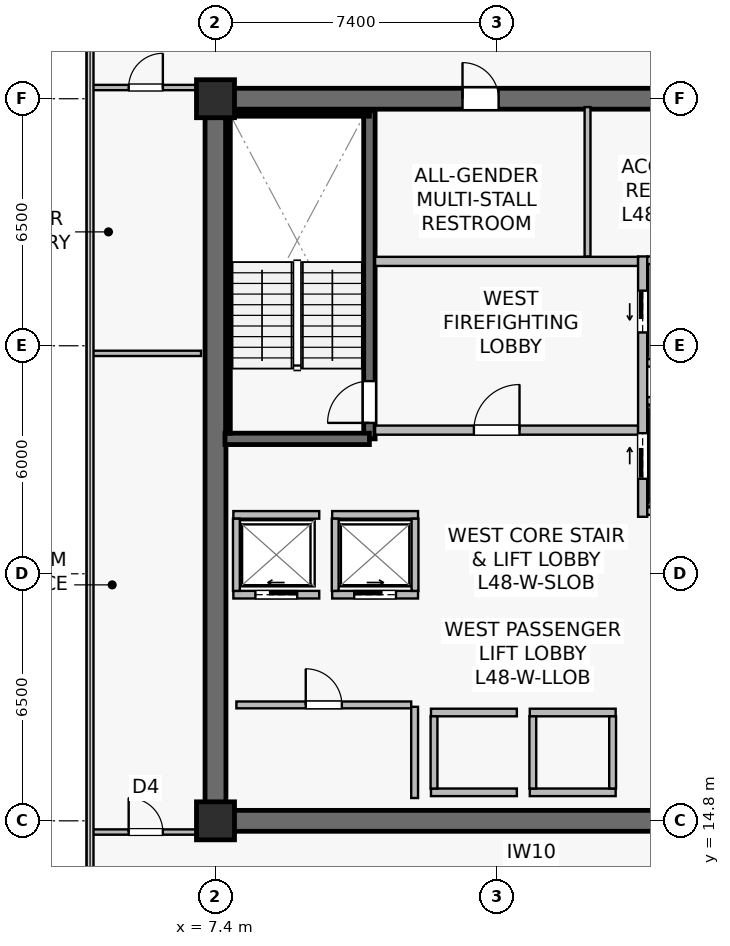
"""IFC4 building model, lengths in metres.
Left out: names, types, materials, properties, quantities, classifications, styles, units other than length and angle.
Written with IfcOpenShell. Run it as: python <this file> out.ifc"""

import sys

from ifc_helpers import new_model, si_unit, direction, frame, frame_2d, origin, origin_2d, place, context, subcontext, project, spatial, rectangle, extrude, source, transform, mapped, element, fill, save


model = new_model("IFC4")
c1 = context("Model", 3, precision=1e-05, world=origin(), true_north=direction((0.0, 1.0)))
c2 = subcontext(c1, "Body", "Model", "MODEL_VIEW")
j1 = project(units=[si_unit("LENGTHUNIT", "METRE"), si_unit("PLANEANGLEUNIT", "RADIAN")], contexts=[c1])
p1 = place(None, origin())
s1 = spatial("IfcSite", under=j1, at=p1, CompositionType="ELEMENT")
p2 = place(p1, origin())
s2 = spatial("IfcBuilding", under=s1, at=p2, CompositionType="ELEMENT")
p3 = place(p2, frame((0.0, 0.0, 201.4)))
s3 = spatial("IfcBuildingStorey", under=s2, at=p3, CompositionType="ELEMENT", Elevation=201.4)
p4 = place(p3, frame((7.125, 14.8, 0.0), z_axis=(0.0, 0.0, 1.0), x_axis=(1.0, 0.0, 0.0)))
e1 = element("IfcWall", 1, at=p4, inside=s3, PredefinedType="SHEAR", context=c2, shape_type="SweptSolid", body=[
    extrude(rectangle(XDim=15.35, YDim=0.55, at=frame_2d((7.675, 0.0))), origin(), (0.0, 0.0, 1.0), 3.8),
])
p5 = place(p3, frame((7.125, 33.8, 0.0), z_axis=(0.0, 0.0, 1.0), x_axis=(1.0, 0.0, 0.0)))
e2 = element("IfcWall", 2, at=p5, inside=s3, PredefinedType="SHEAR", context=c2, shape_type="SweptSolid", body=[
    extrude(rectangle(XDim=15.35, YDim=0.55, at=frame_2d((7.675, 0.0))), origin(), (0.0, 0.0, 1.0), 3.8),
])
p6 = place(p5, frame((6.775, 0.0, 0.0)))
e3 = element("IfcOpeningElement", 3, at=p6, cuts=e2, PredefinedType="OPENING", context=c2, shape_type="SweptSolid", body=[
    extrude(rectangle(XDim=0.95, YDim=2.15, at=frame_2d((0.475, 1.075))), frame((0.0, 0.285, 0.0), z_axis=(0.0, -1.0, 0.0), x_axis=(1.0, 0.0, 0.0)), (0.0, 0.0, 1.0), 0.57),
])
p7 = place(p5, frame((11.84, 0.0, 0.0)))
e4 = element("IfcOpeningElement", 4, at=p7, cuts=e2, PredefinedType="OPENING", context=c2, shape_type="SweptSolid", body=[
    extrude(rectangle(XDim=0.95, YDim=2.15, at=frame_2d((0.475, 1.075))), frame((0.0, 0.285, 0.0), z_axis=(0.0, -1.0, 0.0), x_axis=(1.0, 0.0, 0.0)), (0.0, 0.0, 1.0), 0.57),
])
p8 = place(p3, frame((7.4, 15.075, 0.0), z_axis=(0.0, 0.0, 1.0), x_axis=(0.0, 1.0, 0.0)))
e5 = element("IfcWall", 5, at=p8, inside=s3, PredefinedType="SHEAR", context=c2, shape_type="SweptSolid", body=[
    extrude(rectangle(XDim=18.45, YDim=0.55, at=frame_2d((9.225, 0.0))), origin(), (0.0, 0.0, 1.0), 3.8),
])
p9 = place(p3, frame((11.45, 24.85, 0.0), z_axis=(0.0, 0.0, 1.0), x_axis=(0.0, 1.0, 0.0)))
e6 = element("IfcWall", 6, at=p9, inside=s3, PredefinedType="SHEAR", context=c2, shape_type="SweptSolid", body=[
    extrude(rectangle(XDim=8.63, YDim=0.3, at=frame_2d((4.315, 0.0))), origin(), (0.0, 0.0, 1.0), 3.8),
])
p10 = place(p9, frame((0.42, 0.0, 0.0)))
e7 = element("IfcOpeningElement", 7, at=p10, cuts=e6, PredefinedType="OPENING", context=c2, shape_type="SweptSolid", body=[
    extrude(rectangle(XDim=1.1, YDim=2.15, at=frame_2d((0.55, 1.075))), frame((0.0, 0.16, 0.0), z_axis=(0.0, -1.0, 0.0), x_axis=(1.0, 0.0, 0.0)), (0.0, 0.0, 1.0), 0.32),
])
p11 = place(p3, frame((7.65, 24.85, 0.0), z_axis=(0.0, 0.0, 1.0), x_axis=(1.0, 0.0, 0.0)))
e8 = element("IfcWall", 8, at=p11, inside=s3, PredefinedType="SHEAR", context=c2, shape_type="SweptSolid", body=[
    extrude(rectangle(XDim=3.8, YDim=0.3, at=frame_2d((1.9, 0.0))), origin(), (0.0, 0.0, 1.0), 3.8),
])
p12 = place(p3, frame((7.73, 33.4, 0.0), z_axis=(0.0, 0.0, 1.0), x_axis=(1.0, 0.0, 0.0)))
e9 = element("IfcWall", 9, at=p12, inside=s3, PredefinedType="SOLIDWALL", context=c2, shape_type="SweptSolid", body=[
    extrude(rectangle(XDim=3.72, YDim=0.12, at=frame_2d((1.86, 0.0))), origin(), (0.0, 0.0, 1.0), 3.8),
])
p13 = place(p3, frame((7.73, 25.0, 0.0), z_axis=(0.0, 0.0, 1.0), x_axis=(0.0, 1.0, 0.0)))
e10 = element("IfcWall", 10, at=p13, inside=s3, PredefinedType="SOLIDWALL", context=c2, shape_type="SweptSolid", body=[
    extrude(rectangle(XDim=8.32, YDim=0.12, at=frame_2d((4.16, 0.0))), origin(), (0.0, 0.0, 1.0), 3.8),
])
m1 = source(origin(), c2, "Body", "SweptSolid", [
    extrude(rectangle(XDim=1.0, YDim=1.0, at=origin_2d()), origin(), (0.0, 0.0, 1.0), 4.1),
])
for number, where, z_axis, x_axis in (
    (11, (7.4, 14.8, 0.0), (0.0, 0.0, 1.0), (1.0, 0.0, 0.0)),
    (12, (7.4, 33.8, 0.0), (0.0, 0.0, 1.0), (1.0, 0.0, 0.0)),
):
    element("IfcColumn", number, at=place(p3, frame(where, z_axis=z_axis, x_axis=x_axis)), inside=s3, PredefinedType="COLUMN", context=c2, shape_type="MappedRepresentation", body=[
        mapped(m1, transform((0.0, 0.0, 0.0), scale=1.0)),
    ])
p14 = place(p3, frame((11.6, 25.08, 0.0), z_axis=(0.0, 0.0, 1.0), x_axis=(1.0, 0.0, 0.0)))
e13 = element("IfcWall", 13, at=p14, inside=s3, PredefinedType="SOLIDWALL", context=c2, shape_type="SweptSolid", body=[
    extrude(rectangle(XDim=6.92, YDim=0.24, at=frame_2d((3.46, 0.0))), origin(), (0.0, 0.0, 1.0), 3.197),
])
p15 = place(p14, frame((2.6, 0.0, 0.0)))
e14 = element("IfcOpeningElement", 14, at=p15, cuts=e13, PredefinedType="OPENING", context=c2, shape_type="SweptSolid", body=[
    extrude(rectangle(XDim=1.2, YDim=2.16, at=frame_2d((0.6, 1.08))), frame((0.0, 0.13, 0.0), z_axis=(0.0, -1.0, 0.0), x_axis=(1.0, 0.0, 0.0)), (0.0, 0.0, 1.0), 0.26),
])
p16 = place(p3, frame((11.6, 29.52, 0.0), z_axis=(0.0, 0.0, 1.0), x_axis=(1.0, 0.0, 0.0)))
e15 = element("IfcWall", 15, at=p16, inside=s3, PredefinedType="SOLIDWALL", context=c2, shape_type="SweptSolid", body=[
    extrude(rectangle(XDim=6.92, YDim=0.24, at=frame_2d((3.46, 0.0))), origin(), (0.0, 0.0, 1.0), 3.197),
])
p17 = place(p3, frame((18.64, 22.8, 0.0), z_axis=(0.0, 0.0, 1.0), x_axis=(0.0, 1.0, 0.0)))
e16 = element("IfcWall", 16, at=p17, inside=s3, PredefinedType="SOLIDWALL", context=c2, shape_type="SweptSolid", body=[
    extrude(rectangle(XDim=6.85, YDim=0.24, at=frame_2d((3.425, 0.0))), origin(), (0.0, 0.0, 1.0), 2.935),
])
p18 = place(p17, frame((4.85, 0.0, 0.0)))
e17 = element("IfcOpeningElement", 17, at=p18, cuts=e16, PredefinedType="OPENING", context=c2, shape_type="SweptSolid", body=[
    extrude(rectangle(XDim=1.1, YDim=2.22, at=frame_2d((0.55, 1.11))), frame((0.0, 0.13, 0.0), z_axis=(0.0, -1.0, 0.0), x_axis=(1.0, 0.0, 0.0)), (0.0, 0.0, 1.0), 0.26),
])
p19 = place(p17, frame((1.0, 0.0, 0.0)))
e18 = element("IfcOpeningElement", 18, at=p19, cuts=e16, PredefinedType="OPENING", context=c2, shape_type="SweptSolid", body=[
    extrude(rectangle(XDim=1.2, YDim=2.22, at=frame_2d((0.6, 1.11))), frame((0.0, 0.13, 0.0), z_axis=(0.0, -1.0, 0.0), x_axis=(1.0, 0.0, 0.0)), (0.0, 0.0, 1.0), 0.26),
])
for number, where, z_axis, x_axis in (
    (19, (13.07, 17.65, 0.0), (0.0, 0.0, 1.0), (1.0, 0.0, 0.0)),
    (20, (13.07, 15.55, 0.0), (0.0, 0.0, 1.0), (1.0, 0.0, 0.0)),
):
    element("IfcWall", number, at=place(p3, frame(where, z_axis=z_axis, x_axis=x_axis)), inside=s3, PredefinedType="SOLIDWALL", context=c2, shape_type="SweptSolid", body=[
        extrude(rectangle(XDim=2.26, YDim=0.2, at=frame_2d((1.13, 0.0))), origin(), (0.0, 0.0, 1.0), 3.197),
    ])
p20 = place(p3, frame((13.15, 15.65, 0.0), z_axis=(0.0, 0.0, 1.0), x_axis=(0.0, 1.0, 0.0)))
e21 = element("IfcWall", 21, at=p20, inside=s3, PredefinedType="SOLIDWALL", context=c2, shape_type="SweptSolid", body=[
    extrude(rectangle(XDim=1.9, YDim=0.18, at=frame_2d((0.95, 0.0))), origin(), (0.0, 0.0, 1.0), 3.8),
])
for number, where, z_axis, x_axis in (
    (22, (15.67, 17.65, 0.0), (0.0, 0.0, 1.0), (1.0, 0.0, 0.0)),
    (23, (15.67, 15.55, 0.0), (0.0, 0.0, 1.0), (1.0, 0.0, 0.0)),
):
    element("IfcWall", number, at=place(p3, frame(where, z_axis=z_axis, x_axis=x_axis)), inside=s3, PredefinedType="SOLIDWALL", context=c2, shape_type="SweptSolid", body=[
        extrude(rectangle(XDim=2.26, YDim=0.2, at=frame_2d((1.13, 0.0))), origin(), (0.0, 0.0, 1.0), 3.8),
    ])
for number, where, z_axis, x_axis in (
    (24, (15.75, 15.65, 0.0), (0.0, 0.0, 1.0), (0.0, 1.0, 0.0)),
    (25, (17.85, 15.65, 0.0), (0.0, 0.0, 1.0), (0.0, 1.0, 0.0)),
):
    element("IfcWall", number, at=place(p3, frame(where, z_axis=z_axis, x_axis=x_axis)), inside=s3, PredefinedType="SOLIDWALL", context=c2, shape_type="SweptSolid", body=[
        extrude(rectangle(XDim=1.9, YDim=0.18, at=frame_2d((0.95, 0.0))), origin(), (0.0, 0.0, 1.0), 3.8),
    ])
p21 = place(p3, frame((7.87, 20.75, 0.0), z_axis=(0.0, 0.0, 1.0), x_axis=(1.0, 0.0, 0.0)))
e26 = element("IfcWall", 26, at=p21, inside=s3, PredefinedType="SOLIDWALL", context=c2, shape_type="SweptSolid", body=[
    extrude(rectangle(XDim=2.26, YDim=0.2, at=frame_2d((1.13, 0.0))), origin(), (0.0, 0.0, 1.0), 3.8),
])
p22 = place(p21, frame((0.58, 0.0, 0.0)))
e27 = element("IfcOpeningElement", 27, at=p22, cuts=e26, PredefinedType="OPENING", context=c2, shape_type="SweptSolid", body=[
    extrude(rectangle(XDim=1.1, YDim=2.22, at=frame_2d((0.55, 1.11))), frame((0.0, 0.11, 0.0), z_axis=(0.0, -1.0, 0.0), x_axis=(1.0, 0.0, 0.0)), (0.0, 0.0, 1.0), 0.22),
])
p23 = place(p3, frame((7.87, 22.85, 0.0), z_axis=(0.0, 0.0, 1.0), x_axis=(1.0, 0.0, 0.0)))
e28 = element("IfcWall", 28, at=p23, inside=s3, PredefinedType="SOLIDWALL", context=c2, shape_type="SweptSolid", body=[
    extrude(rectangle(XDim=2.26, YDim=0.2, at=frame_2d((1.13, 0.0))), origin(), (0.0, 0.0, 1.0), 3.8),
])
p24 = place(p3, frame((7.95, 20.85, 0.0), z_axis=(0.0, 0.0, 1.0), x_axis=(0.0, 1.0, 0.0)))
e29 = element("IfcWall", 29, at=p24, inside=s3, PredefinedType="SOLIDWALL", context=c2, shape_type="SweptSolid", body=[
    extrude(rectangle(XDim=1.9, YDim=0.18, at=frame_2d((0.95, 0.0))), origin(), (0.0, 0.0, 1.0), 3.8),
])
p25 = place(p3, frame((10.47, 20.75, 0.0), z_axis=(0.0, 0.0, 1.0), x_axis=(1.0, 0.0, 0.0)))
e30 = element("IfcWall", 30, at=p25, inside=s3, PredefinedType="SOLIDWALL", context=c2, shape_type="SweptSolid", body=[
    extrude(rectangle(XDim=2.26, YDim=0.2, at=frame_2d((1.13, 0.0))), origin(), (0.0, 0.0, 1.0), 3.8),
])
p26 = place(p25, frame((0.58, 0.0, 0.0)))
e31 = element("IfcOpeningElement", 31, at=p26, cuts=e30, PredefinedType="OPENING", context=c2, shape_type="SweptSolid", body=[
    extrude(rectangle(XDim=1.1, YDim=2.22, at=frame_2d((0.55, 1.11))), frame((0.0, 0.11, 0.0), z_axis=(0.0, -1.0, 0.0), x_axis=(1.0, 0.0, 0.0)), (0.0, 0.0, 1.0), 0.22),
])
p27 = place(p3, frame((10.47, 22.85, 0.0), z_axis=(0.0, 0.0, 1.0), x_axis=(1.0, 0.0, 0.0)))
e32 = element("IfcWall", 32, at=p27, inside=s3, PredefinedType="SOLIDWALL", context=c2, shape_type="SweptSolid", body=[
    extrude(rectangle(XDim=2.26, YDim=0.2, at=frame_2d((1.13, 0.0))), origin(), (0.0, 0.0, 1.0), 3.8),
])
for number, where, z_axis, x_axis in (
    (33, (10.55, 20.85, 0.0), (0.0, 0.0, 1.0), (0.0, 1.0, 0.0)),
    (34, (12.65, 20.85, 0.0), (0.0, 0.0, 1.0), (0.0, 1.0, 0.0)),
):
    element("IfcWall", number, at=place(p3, frame(where, z_axis=z_axis, x_axis=x_axis)), inside=s3, PredefinedType="SOLIDWALL", context=c2, shape_type="SweptSolid", body=[
        extrude(rectangle(XDim=1.9, YDim=0.18, at=frame_2d((0.95, 0.0))), origin(), (0.0, 0.0, 1.0), 3.8),
    ])
p28 = place(p3, frame((18.76, 29.55, 0.0), z_axis=(0.0, 0.0, 1.0), x_axis=(1.0, 0.0, 0.0)))
e35 = element("IfcWall", 35, at=p28, inside=s3, PredefinedType="SOLIDWALL", context=c2, shape_type="SweptSolid", body=[
    extrude(rectangle(XDim=2.19, YDim=0.2, at=frame_2d((1.095, 0.0))), origin(), (0.0, 0.0, 1.0), 3.8),
])
p29 = place(p3, frame((18.76, 26.85, 0.0), z_axis=(0.0, 0.0, 1.0), x_axis=(1.0, 0.0, 0.0)))
e36 = element("IfcWall", 36, at=p29, inside=s3, PredefinedType="SOLIDWALL", context=c2, shape_type="SweptSolid", body=[
    extrude(rectangle(XDim=2.19, YDim=0.2, at=frame_2d((1.095, 0.0))), origin(), (0.0, 0.0, 1.0), 3.197),
])
for number, where, z_axis, x_axis in (
    (37, (18.76, 25.85, 0.0), (0.0, 0.0, 1.0), (1.0, 0.0, 0.0)),
    (38, (18.76, 22.95, 0.0), (0.0, 0.0, 1.0), (1.0, 0.0, 0.0)),
):
    element("IfcWall", number, at=place(p3, frame(where, z_axis=z_axis, x_axis=x_axis)), inside=s3, PredefinedType="SOLIDWALL", context=c2, shape_type="SweptSolid", body=[
        extrude(rectangle(XDim=2.19, YDim=0.2, at=frame_2d((1.095, 0.0))), origin(), (0.0, 0.0, 1.0), 3.8),
    ])
p30 = place(p3, frame((7.95, 17.85, 0.0), z_axis=(0.0, 0.0, 1.0), x_axis=(1.0, 0.0, 0.0)))
e39 = element("IfcWall", 39, at=p30, inside=s3, PredefinedType="SOLIDWALL", context=c2, shape_type="SweptSolid", body=[
    extrude(rectangle(XDim=4.6, YDim=0.18, at=frame_2d((2.3, 0.0))), origin(), (0.0, 0.0, 1.0), 3.8),
])
p31 = place(p30, frame((1.825, 0.0, 0.0)))
e40 = element("IfcOpeningElement", 40, at=p31, cuts=e39, PredefinedType="OPENING", context=c2, shape_type="SweptSolid", body=[
    extrude(rectangle(XDim=0.95, YDim=2.15, at=frame_2d((0.475, 1.075))), frame((0.0, 0.1, 0.0), z_axis=(0.0, -1.0, 0.0), x_axis=(1.0, 0.0, 0.0)), (0.0, 0.0, 1.0), 0.2),
])
p32 = place(p3, frame((12.64, 15.4, 0.0), z_axis=(0.0, 0.0, 1.0), x_axis=(0.0, 1.0, 0.0)))
e41 = element("IfcWall", 41, at=p32, inside=s3, PredefinedType="SOLIDWALL", context=c2, shape_type="SweptSolid", body=[
    extrude(rectangle(XDim=2.4, YDim=0.18, at=frame_2d((1.2, 0.0))), origin(), (0.0, 0.0, 1.0), 3.8),
])
p33 = place(p3, frame((17.19, 29.65, 0.0), z_axis=(0.0, 0.0, 1.0), x_axis=(0.0, 1.0, 0.0)))
e42 = element("IfcWall", 42, at=p33, inside=s3, PredefinedType="PLUMBINGWALL", context=c2, shape_type="SweptSolid", body=[
    extrude(rectangle(XDim=3.93, YDim=0.155, at=frame_2d((1.965, 0.0))), origin(), (0.0, 0.0, 1.0), 3.8),
])
p34 = place(p3, frame((4.11, 27.1, 0.0), z_axis=(0.0, 0.0, 1.0), x_axis=(1.0, 0.0, 0.0)))
e43 = element("IfcWall", 43, at=p34, inside=s3, PredefinedType="PARTITIONING", context=c2, shape_type="SweptSolid", body=[
    extrude(rectangle(XDim=2.91, YDim=0.14, at=frame_2d((1.455, 0.0))), origin(), (0.0, 0.0, 1.0), 3.8),
])
p35 = place(p3, frame((4.11, 14.505, 0.0), z_axis=(0.0, 0.0, 1.0), x_axis=(1.0, 0.0, 0.0)))
e44 = element("IfcWall", 44, at=p35, inside=s3, PredefinedType="PARTITIONING", context=c2, shape_type="SweptSolid", body=[
    extrude(rectangle(XDim=2.91, YDim=0.14, at=frame_2d((1.455, 0.0))), origin(), (0.0, 0.0, 1.0), 3.8),
])
p36 = place(p35, frame((1.005, 0.0, 0.0)))
e45 = element("IfcOpeningElement", 45, at=p36, cuts=e44, PredefinedType="OPENING", context=c2, shape_type="SweptSolid", body=[
    extrude(rectangle(XDim=0.9, YDim=2.1, at=frame_2d((0.45, 1.05))), frame((0.0, 0.08, 0.0), z_axis=(0.0, -1.0, 0.0), x_axis=(1.0, 0.0, 0.0)), (0.0, 0.0, 1.0), 0.16),
])
p37 = place(p3, frame((4.11, 34.095, 0.0), z_axis=(0.0, 0.0, 1.0), x_axis=(1.0, 0.0, 0.0)))
e46 = element("IfcWall", 46, at=p37, inside=s3, PredefinedType="PARTITIONING", context=c2, shape_type="SweptSolid", body=[
    extrude(rectangle(XDim=2.91, YDim=0.14, at=frame_2d((1.455, 0.0))), origin(), (0.0, 0.0, 1.0), 3.8),
])
p38 = place(p37, frame((1.005, 0.0, 0.0)))
e47 = element("IfcOpeningElement", 47, at=p38, cuts=e46, PredefinedType="OPENING", context=c2, shape_type="SweptSolid", body=[
    extrude(rectangle(XDim=0.9, YDim=2.1, at=frame_2d((0.45, 1.05))), frame((0.0, 0.08, 0.0), z_axis=(0.0, -1.0, 0.0), x_axis=(1.0, 0.0, 0.0)), (0.0, 0.0, 1.0), 0.16),
])
m2 = source(origin(), c2, "Body", "SweptSolid", [
    extrude(rectangle(XDim=1.1, YDim=2.15, at=frame_2d((0.55, 1.075))), frame((0.0, 0.025, 0.0), z_axis=(0.0, -1.0, 0.0), x_axis=(1.0, 0.0, 0.0)), (0.0, 0.0, 1.0), 0.05),
])
p39 = place(p10, origin())
e48 = element("IfcDoor", 48, at=p39, inside=s3, OperationType="SINGLE_SWING_LEFT", PredefinedType="DOOR", context=c2, shape_type="MappedRepresentation", body=[
    mapped(m2, transform((0.0, 0.0, 0.0), scale=1.0)),
])
fill(e7, e48)
m3 = source(origin(), c2, "Body", "SweptSolid", [
    extrude(rectangle(XDim=1.2, YDim=2.16, at=frame_2d((0.6, 1.08))), frame((0.0, 0.025, 0.0), z_axis=(0.0, -1.0, 0.0), x_axis=(1.0, 0.0, 0.0)), (0.0, 0.0, 1.0), 0.05),
])
p40 = place(p15, origin())
e49 = element("IfcDoor", 49, at=p40, inside=s3, OperationType="SINGLE_SWING_RIGHT", PredefinedType="DOOR", context=c2, shape_type="MappedRepresentation", body=[
    mapped(m3, transform((0.0, 0.0, 0.0), scale=1.0)),
])
fill(e14, e49)
m4 = source(origin(), c2, "Body", "SweptSolid", [
    extrude(rectangle(XDim=1.1, YDim=2.22, at=frame_2d((0.55, 1.11))), frame((0.0, 0.025, 0.0), z_axis=(0.0, -1.0, 0.0), x_axis=(1.0, 0.0, 0.0)), (0.0, 0.0, 1.0), 0.05),
])
p41 = place(p22, origin())
e50 = element("IfcDoor", 50, at=p41, inside=s3, OperationType="SLIDING_TO_LEFT", PredefinedType="USERDEFINED", context=c2, shape_type="MappedRepresentation", body=[
    mapped(m4, transform((0.0, 0.0, 0.0), scale=1.0)),
])
fill(e27, e50)
p42 = place(p26, origin())
e51 = element("IfcDoor", 51, at=p42, inside=s3, OperationType="SLIDING_TO_RIGHT", PredefinedType="USERDEFINED", context=c2, shape_type="MappedRepresentation", body=[
    mapped(m4, transform((0.0, 0.0, 0.0), scale=1.0)),
])
fill(e31, e51)
p43 = place(p18, origin())
e52 = element("IfcDoor", 52, at=p43, inside=s3, OperationType="SLIDING_TO_LEFT", PredefinedType="USERDEFINED", context=c2, shape_type="MappedRepresentation", body=[
    mapped(m4, transform((0.0, 0.0, 0.0), scale=1.0)),
])
fill(e17, e52)
m5 = source(origin(), c2, "Body", "SweptSolid", [
    extrude(rectangle(XDim=1.2, YDim=2.22, at=frame_2d((0.6, 1.11))), frame((0.0, 0.025, 0.0), z_axis=(0.0, -1.0, 0.0), x_axis=(1.0, 0.0, 0.0)), (0.0, 0.0, 1.0), 0.05),
])
p44 = place(p19, origin())
e53 = element("IfcDoor", 53, at=p44, inside=s3, OperationType="SLIDING_TO_RIGHT", PredefinedType="USERDEFINED", context=c2, shape_type="MappedRepresentation", body=[
    mapped(m5, transform((0.0, 0.0, 0.0), scale=1.0)),
])
fill(e18, e53)
m6 = source(origin(), c2, "Body", "SweptSolid", [
    extrude(rectangle(XDim=0.95, YDim=2.15, at=frame_2d((0.475, 1.075))), frame((0.0, 0.025, 0.0), z_axis=(0.0, -1.0, 0.0), x_axis=(1.0, 0.0, 0.0)), (0.0, 0.0, 1.0), 0.05),
])
p45 = place(p31, origin())
e54 = element("IfcDoor", 54, at=p45, inside=s3, OperationType="SINGLE_SWING_LEFT", PredefinedType="DOOR", context=c2, shape_type="MappedRepresentation", body=[
    mapped(m6, transform((0.0, 0.0, 0.0), scale=1.0)),
])
fill(e40, e54)
p46 = place(p6, origin())
e55 = element("IfcDoor", 55, at=p46, inside=s3, OperationType="SINGLE_SWING_LEFT", PredefinedType="DOOR", context=c2, shape_type="MappedRepresentation", body=[
    mapped(m6, transform((0.0, 0.0, 0.0), scale=1.0)),
])
fill(e3, e55)
m7 = source(origin(), c2, "Body", "SweptSolid", [
    extrude(rectangle(XDim=0.9, YDim=2.1, at=frame_2d((0.45, 1.05))), frame((0.0, 0.025, 0.0), z_axis=(0.0, -1.0, 0.0), x_axis=(1.0, 0.0, 0.0)), (0.0, 0.0, 1.0), 0.05),
])
p47 = place(p36, origin())
e56 = element("IfcDoor", 56, at=p47, inside=s3, OperationType="SINGLE_SWING_LEFT", PredefinedType="DOOR", context=c2, shape_type="MappedRepresentation", body=[
    mapped(m7, transform((0.0, 0.0, 0.0), scale=1.0)),
])
fill(e45, e56)
p48 = place(p38, origin())
e57 = element("IfcDoor", 57, at=p48, inside=s3, OperationType="SINGLE_SWING_RIGHT", PredefinedType="DOOR", context=c2, shape_type="MappedRepresentation", body=[
    mapped(m7, transform((0.0, 0.0, 0.0), scale=1.0)),
])
fill(e47, e57)
save(model, sys.argv[1])
